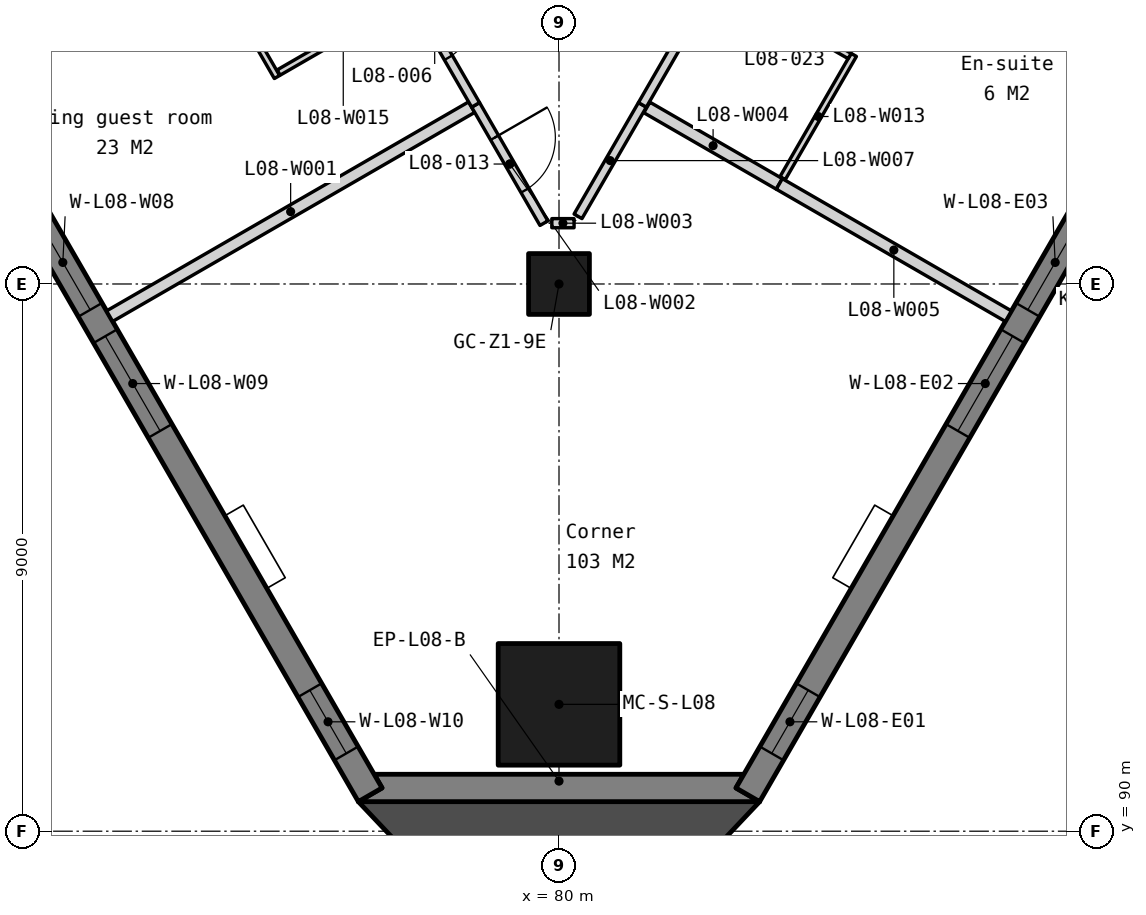
"""IFC4 building model, lengths in metres.
Left out: names, types, materials, properties, quantities, classifications, styles, units other than length and angle.
Written with IfcOpenShell. Run it as: python <this file> out.ifc"""

import sys

from ifc_helpers import new_model, si_unit, direction, frame, frame_2d, origin, origin_2d, place, context, subcontext, project, spatial, polyline, rectangle, outline, extrude, element, fill, save


model = new_model("IFC4")
c1 = context("Model", 3, precision=1e-05, world=origin(), true_north=direction((0.0, 1.0)))
c2 = subcontext(c1, "Body", "Model", "MODEL_VIEW")
j1 = project(units=[si_unit("LENGTHUNIT", "METRE"), si_unit("PLANEANGLEUNIT", "RADIAN")], contexts=[c1])
p1 = place(None, origin())
s1 = spatial("IfcSite", under=j1, at=p1, CompositionType="ELEMENT")
p2 = place(p1, origin())
s2 = spatial("IfcBuilding", under=s1, at=p2, CompositionType="ELEMENT")
p3 = place(p2, frame((0.0, 0.0, 42.0)))
s3 = spatial("IfcBuildingStorey", under=s2, at=p3, CompositionType="ELEMENT", Elevation=42.0)
p4 = place(p3, frame((80.0, 99.0, 0.0), z_axis=(0.0, 0.0, 1.0), x_axis=(1.0, 0.0, 0.0)))
e1 = element("IfcColumn", 1, at=p4, inside=s3, PredefinedType="COLUMN", context=c2, shape_type="SweptSolid", body=[
    extrude(rectangle(XDim=1.0, YDim=1.0, at=origin_2d()), origin(), (0.0, 0.0, 1.0), 3.5),
])
p5 = place(p3, frame((80.0, 92.086, 0.0), z_axis=(0.0, 0.0, 1.0), x_axis=(1.0, 0.0, 0.0)))
e2 = element("IfcColumn", 2, at=p5, inside=s3, PredefinedType="COLUMN", context=c2, shape_type="SweptSolid", body=[
    extrude(rectangle(XDim=2.0, YDim=2.0, at=origin_2d()), origin(), (0.0, 0.0, 1.0), 3.5),
])
p6 = place(p3, frame((0.0, 0.0, -0.15)))
e3 = element("IfcWall", 3, at=p6, inside=s3, PredefinedType="SOLIDWALL", context=c2, shape_type="SweptSolid", body=[
    extrude(outline(polyline([(76.7, 90.486), (77.09, 90.711), (76.96, 90.936), (83.04, 90.936), (82.91, 90.711), (83.3, 90.486), (76.7, 90.486)])), origin(), (0.0, 0.0, 1.0), 3.5),
])
p7 = place(p3, frame((54.495, 129.397, -0.15), z_axis=(0.0, 0.0, 1.0), x_axis=(0.499999201451, -0.866025864826, 0.0)))
e4 = element("IfcWall", 4, at=p7, inside=s3, PredefinedType="SOLIDWALL", context=c2, shape_type="SweptSolid", body=[
    extrude(outline(polyline([(44.8, 0.0), (44.8, 3.5), (0.0, 3.5), (0.0, 0.0), (44.8, 0.0)])), frame((0.0, 0.225, 0.0), z_axis=(0.0, -1.0, 0.0), x_axis=(1.0, 0.0, 0.0)), (0.0, 0.0, 1.0), 0.45),
])
p8 = place(p7, frame((0.786, 0.0, 1.05)))
e5 = element("IfcOpeningElement", 5, at=p8, cuts=e4, PredefinedType="OPENING", context=c2, shape_type="SweptSolid", body=[
    extrude(rectangle(XDim=1.2, YDim=1.5, at=frame_2d((0.6, 0.75))), frame((0.0, 0.235, 0.0), z_axis=(0.0, -1.0, 0.0), x_axis=(1.0, 0.0, 0.0)), (0.0, 0.0, 1.0), 0.47),
])
p9 = place(p7, frame((6.91, 0.0, 1.05)))
e6 = element("IfcOpeningElement", 6, at=p9, cuts=e4, PredefinedType="OPENING", context=c2, shape_type="SweptSolid", body=[
    extrude(rectangle(XDim=1.8, YDim=1.5, at=frame_2d((0.9, 0.75))), frame((0.0, 0.235, 0.0), z_axis=(0.0, -1.0, 0.0), x_axis=(1.0, 0.0, 0.0)), (0.0, 0.0, 1.0), 0.47),
])
p10 = place(p7, frame((9.21, 0.0, 1.05)))
e7 = element("IfcOpeningElement", 7, at=p10, cuts=e4, PredefinedType="OPENING", context=c2, shape_type="SweptSolid", body=[
    extrude(rectangle(XDim=1.8, YDim=1.5, at=frame_2d((0.9, 0.75))), frame((0.0, 0.235, 0.0), z_axis=(0.0, -1.0, 0.0), x_axis=(1.0, 0.0, 0.0)), (0.0, 0.0, 1.0), 0.47),
])
p11 = place(p7, frame((15.87, 0.0, 1.05)))
e8 = element("IfcOpeningElement", 8, at=p11, cuts=e4, PredefinedType="OPENING", context=c2, shape_type="SweptSolid", body=[
    extrude(rectangle(XDim=1.8, YDim=1.5, at=frame_2d((0.9, 0.75))), frame((0.0, 0.235, 0.0), z_axis=(0.0, -1.0, 0.0), x_axis=(1.0, 0.0, 0.0)), (0.0, 0.0, 1.0), 0.47),
])
p12 = place(p7, frame((18.17, 0.0, 1.05)))
e9 = element("IfcOpeningElement", 9, at=p12, cuts=e4, PredefinedType="OPENING", context=c2, shape_type="SweptSolid", body=[
    extrude(rectangle(XDim=1.8, YDim=1.5, at=frame_2d((0.9, 0.75))), frame((0.0, 0.235, 0.0), z_axis=(0.0, -1.0, 0.0), x_axis=(1.0, 0.0, 0.0)), (0.0, 0.0, 1.0), 0.47),
])
p13 = place(p7, frame((24.83, 0.0, 1.05)))
e10 = element("IfcOpeningElement", 10, at=p13, cuts=e4, PredefinedType="OPENING", context=c2, shape_type="SweptSolid", body=[
    extrude(rectangle(XDim=1.8, YDim=1.5, at=frame_2d((0.9, 0.75))), frame((0.0, 0.235, 0.0), z_axis=(0.0, -1.0, 0.0), x_axis=(1.0, 0.0, 0.0)), (0.0, 0.0, 1.0), 0.47),
])
p14 = place(p7, frame((27.13, 0.0, 1.05)))
e11 = element("IfcOpeningElement", 11, at=p14, cuts=e4, PredefinedType="OPENING", context=c2, shape_type="SweptSolid", body=[
    extrude(rectangle(XDim=1.8, YDim=1.5, at=frame_2d((0.9, 0.75))), frame((0.0, 0.235, 0.0), z_axis=(0.0, -1.0, 0.0), x_axis=(1.0, 0.0, 0.0)), (0.0, 0.0, 1.0), 0.47),
])
p15 = place(p7, frame((33.79, 0.0, 1.05)))
e12 = element("IfcOpeningElement", 12, at=p15, cuts=e4, PredefinedType="OPENING", context=c2, shape_type="SweptSolid", body=[
    extrude(rectangle(XDim=1.8, YDim=1.5, at=frame_2d((0.9, 0.75))), frame((0.0, 0.235, 0.0), z_axis=(0.0, -1.0, 0.0), x_axis=(1.0, 0.0, 0.0)), (0.0, 0.0, 1.0), 0.47),
])
p16 = place(p7, frame((36.09, 0.0, 1.05)))
e13 = element("IfcOpeningElement", 13, at=p16, cuts=e4, PredefinedType="OPENING", context=c2, shape_type="SweptSolid", body=[
    extrude(rectangle(XDim=1.8, YDim=1.5, at=frame_2d((0.9, 0.75))), frame((0.0, 0.235, 0.0), z_axis=(0.0, -1.0, 0.0), x_axis=(1.0, 0.0, 0.0)), (0.0, 0.0, 1.0), 0.47),
])
p17 = place(p7, frame((42.814, 0.0, 1.05)))
e14 = element("IfcOpeningElement", 14, at=p17, cuts=e4, PredefinedType="OPENING", context=c2, shape_type="SweptSolid", body=[
    extrude(rectangle(XDim=1.2, YDim=1.5, at=frame_2d((0.6, 0.75))), frame((0.0, 0.235, 0.0), z_axis=(0.0, -1.0, 0.0), x_axis=(1.0, 0.0, 0.0)), (0.0, 0.0, 1.0), 0.47),
])
p18 = place(p3, frame((83.105, 90.599, -0.15), z_axis=(0.0, 0.0, 1.0), x_axis=(0.499999201451, 0.866025864826, 0.0)))
e15 = element("IfcWall", 15, at=p18, inside=s3, PredefinedType="SOLIDWALL", context=c2, shape_type="SweptSolid", body=[
    extrude(outline(polyline([(44.8, 0.0), (44.8, 3.5), (0.0, 3.5), (0.0, 0.0), (44.8, 0.0)])), frame((0.0, 0.225, 0.0), z_axis=(0.0, -1.0, 0.0), x_axis=(1.0, 0.0, 0.0)), (0.0, 0.0, 1.0), 0.45),
])
p19 = place(p18, frame((0.786, 0.0, 1.05)))
e16 = element("IfcOpeningElement", 16, at=p19, cuts=e15, PredefinedType="OPENING", context=c2, shape_type="SweptSolid", body=[
    extrude(rectangle(XDim=1.2, YDim=1.5, at=frame_2d((0.6, 0.75))), frame((0.0, 0.235, 0.0), z_axis=(0.0, -1.0, 0.0), x_axis=(1.0, 0.0, 0.0)), (0.0, 0.0, 1.0), 0.47),
])
p20 = place(p18, frame((6.91, 0.0, 1.05)))
e17 = element("IfcOpeningElement", 17, at=p20, cuts=e15, PredefinedType="OPENING", context=c2, shape_type="SweptSolid", body=[
    extrude(rectangle(XDim=1.8, YDim=1.5, at=frame_2d((0.9, 0.75))), frame((0.0, 0.235, 0.0), z_axis=(0.0, -1.0, 0.0), x_axis=(1.0, 0.0, 0.0)), (0.0, 0.0, 1.0), 0.47),
])
p21 = place(p18, frame((9.21, 0.0, 1.05)))
e18 = element("IfcOpeningElement", 18, at=p21, cuts=e15, PredefinedType="OPENING", context=c2, shape_type="SweptSolid", body=[
    extrude(rectangle(XDim=1.8, YDim=1.5, at=frame_2d((0.9, 0.75))), frame((0.0, 0.235, 0.0), z_axis=(0.0, -1.0, 0.0), x_axis=(1.0, 0.0, 0.0)), (0.0, 0.0, 1.0), 0.47),
])
p22 = place(p18, frame((15.87, 0.0, 1.05)))
e19 = element("IfcOpeningElement", 19, at=p22, cuts=e15, PredefinedType="OPENING", context=c2, shape_type="SweptSolid", body=[
    extrude(rectangle(XDim=1.8, YDim=1.5, at=frame_2d((0.9, 0.75))), frame((0.0, 0.235, 0.0), z_axis=(0.0, -1.0, 0.0), x_axis=(1.0, 0.0, 0.0)), (0.0, 0.0, 1.0), 0.47),
])
p23 = place(p18, frame((18.17, 0.0, 1.05)))
e20 = element("IfcOpeningElement", 20, at=p23, cuts=e15, PredefinedType="OPENING", context=c2, shape_type="SweptSolid", body=[
    extrude(rectangle(XDim=1.8, YDim=1.5, at=frame_2d((0.9, 0.75))), frame((0.0, 0.235, 0.0), z_axis=(0.0, -1.0, 0.0), x_axis=(1.0, 0.0, 0.0)), (0.0, 0.0, 1.0), 0.47),
])
p24 = place(p18, frame((24.83, 0.0, 1.05)))
e21 = element("IfcOpeningElement", 21, at=p24, cuts=e15, PredefinedType="OPENING", context=c2, shape_type="SweptSolid", body=[
    extrude(rectangle(XDim=1.8, YDim=1.5, at=frame_2d((0.9, 0.75))), frame((0.0, 0.235, 0.0), z_axis=(0.0, -1.0, 0.0), x_axis=(1.0, 0.0, 0.0)), (0.0, 0.0, 1.0), 0.47),
])
p25 = place(p18, frame((27.13, 0.0, 1.05)))
e22 = element("IfcOpeningElement", 22, at=p25, cuts=e15, PredefinedType="OPENING", context=c2, shape_type="SweptSolid", body=[
    extrude(rectangle(XDim=1.8, YDim=1.5, at=frame_2d((0.9, 0.75))), frame((0.0, 0.235, 0.0), z_axis=(0.0, -1.0, 0.0), x_axis=(1.0, 0.0, 0.0)), (0.0, 0.0, 1.0), 0.47),
])
p26 = place(p18, frame((33.79, 0.0, 1.05)))
e23 = element("IfcOpeningElement", 23, at=p26, cuts=e15, PredefinedType="OPENING", context=c2, shape_type="SweptSolid", body=[
    extrude(rectangle(XDim=1.8, YDim=1.5, at=frame_2d((0.9, 0.75))), frame((0.0, 0.235, 0.0), z_axis=(0.0, -1.0, 0.0), x_axis=(1.0, 0.0, 0.0)), (0.0, 0.0, 1.0), 0.47),
])
p27 = place(p18, frame((36.09, 0.0, 1.05)))
e24 = element("IfcOpeningElement", 24, at=p27, cuts=e15, PredefinedType="OPENING", context=c2, shape_type="SweptSolid", body=[
    extrude(rectangle(XDim=1.8, YDim=1.5, at=frame_2d((0.9, 0.75))), frame((0.0, 0.235, 0.0), z_axis=(0.0, -1.0, 0.0), x_axis=(1.0, 0.0, 0.0)), (0.0, 0.0, 1.0), 0.47),
])
p28 = place(p18, frame((42.814, 0.0, 1.05)))
e25 = element("IfcOpeningElement", 25, at=p28, cuts=e15, PredefinedType="OPENING", context=c2, shape_type="SweptSolid", body=[
    extrude(rectangle(XDim=1.2, YDim=1.5, at=frame_2d((0.6, 0.75))), frame((0.0, 0.235, 0.0), z_axis=(0.0, -1.0, 0.0), x_axis=(1.0, 0.0, 0.0)), (0.0, 0.0, 1.0), 0.47),
])
p29 = place(p3, frame((0.0, 0.0, -0.15)))
e26 = element("IfcWall", 26, at=p29, inside=s3, PredefinedType="SOLIDWALL", context=c2, shape_type="SweptSolid", body=[
    extrude(outline(polyline([(76.7, 90.486), (80.0, 86.996), (83.3, 90.486), (76.7, 90.486)])), origin(), (0.0, 0.0, 1.0), 3.5),
])
p30 = place(p3, frame((72.61, 98.471, 0.0), z_axis=(0.0, 0.0, 1.0), x_axis=(0.866031836714, 0.499988857673, 0.0)))
e27 = element("IfcWall", 27, at=p30, inside=s3, PredefinedType="PARTITIONING", context=c2, shape_type="SweptSolid", body=[
    extrude(rectangle(XDim=6.875, YDim=0.2, at=frame_2d((3.438, 0.0))), origin(), (0.0, 0.0, 1.0), 3.35),
])
p31 = place(p3, frame((78.629, 101.946, 0.0), z_axis=(0.0, 0.0, 1.0), x_axis=(0.499960746528, -0.866048065601, 0.0)))
e28 = element("IfcWall", 28, at=p31, inside=s3, PredefinedType="PARTITIONING", context=c2, shape_type="SweptSolid", body=[
    extrude(rectangle(XDim=2.247, YDim=0.15, at=frame_2d((1.124, 0.0))), origin(), (0.0, 0.0, 1.0), 3.35),
])
p32 = place(p31, frame((0.624, 0.0, 0.0)))
e29 = element("IfcOpeningElement", 29, at=p32, cuts=e28, PredefinedType="OPENING", context=c2, shape_type="SweptSolid", body=[
    extrude(rectangle(XDim=1.0, YDim=2.1, at=frame_2d((0.5, 1.05))), frame((0.0, 0.085, 0.0), z_axis=(0.0, -1.0, 0.0), x_axis=(1.0, 0.0, 0.0)), (0.0, 0.0, 1.0), 0.17),
])
p33 = place(p3, frame((79.882, 100.0, 0.0), z_axis=(0.0, 0.0, 1.0), x_axis=(1.0, 0.0, 0.0)))
e30 = element("IfcWall", 30, at=p33, inside=s3, PredefinedType="PARTITIONING", context=c2, shape_type="SweptSolid", body=[
    extrude(rectangle(XDim=0.365, YDim=0.15, at=frame_2d((0.183, 0.0))), origin(), (0.0, 0.0, 1.0), 3.35),
])
p34 = place(p3, frame((81.445, 101.903, 0.0), z_axis=(0.0, 0.0, 1.0), x_axis=(0.866048176357, -0.499960554673, 0.0)))
e31 = element("IfcWall", 31, at=p34, inside=s3, PredefinedType="PARTITIONING", context=c2, shape_type="SweptSolid", body=[
    extrude(rectangle(XDim=2.515, YDim=0.2, at=frame_2d((1.257, 0.0))), origin(), (0.0, 0.0, 1.0), 3.35),
])
p35 = place(p3, frame((83.623, 100.646, 0.0), z_axis=(0.0, 0.0, 1.0), x_axis=(0.866027639635, -0.499996127374, 0.0)))
e32 = element("IfcWall", 32, at=p35, inside=s3, PredefinedType="PARTITIONING", context=c2, shape_type="SweptSolid", body=[
    extrude(rectangle(XDim=4.35, YDim=0.2, at=frame_2d((2.175, 0.0))), origin(), (0.0, 0.0, 1.0), 3.35),
])
p36 = place(p3, frame((76.389, 105.826, 0.0), z_axis=(0.0, 0.0, 1.0), x_axis=(0.499989762656, -0.866031314237, 0.0)))
e33 = element("IfcWall", 33, at=p36, inside=s3, PredefinedType="PARTITIONING", context=c2, shape_type="SweptSolid", body=[
    extrude(rectangle(XDim=4.48, YDim=0.15, at=frame_2d((2.24, 0.0))), origin(), (0.0, 0.0, 1.0), 3.35),
])
p37 = place(p36, frame((2.684, 0.0, 0.0)))
e34 = element("IfcOpeningElement", 34, at=p37, cuts=e33, PredefinedType="OPENING", context=c2, shape_type="SweptSolid", body=[
    extrude(rectangle(XDim=0.9, YDim=2.1, at=frame_2d((0.45, 1.05))), frame((0.0, 0.085, 0.0), z_axis=(0.0, -1.0, 0.0), x_axis=(1.0, 0.0, 0.0)), (0.0, 0.0, 1.0), 0.17),
])
p38 = place(p3, frame((80.313, 100.113, 0.0), z_axis=(0.0, 0.0, 1.0), x_axis=(0.5000585414, 0.865991602253, 0.0)))
e35 = element("IfcWall", 35, at=p38, inside=s3, PredefinedType="PARTITIONING", context=c2, shape_type="SweptSolid", body=[
    extrude(rectangle(XDim=2.117, YDim=0.15, at=frame_2d((1.059, 0.0))), origin(), (0.0, 0.0, 1.0), 3.35),
])
p39 = place(p3, frame((70.37, 102.351, 0.0), z_axis=(0.0, 0.0, 1.0), x_axis=(0.866019763911, 0.500009768421, 0.0)))
e36 = element("IfcWall", 36, at=p39, inside=s3, PredefinedType="PARTITIONING", context=c2, shape_type="SweptSolid", body=[
    extrude(rectangle(XDim=6.865, YDim=0.2, at=frame_2d((3.433, 0.0))), origin(), (0.0, 0.0, 1.0), 3.35),
])
p40 = place(p3, frame((85.863, 104.526, 0.0), z_axis=(0.0, 0.0, 1.0), x_axis=(0.866027639635, -0.499996127374, 0.0)))
e37 = element("IfcWall", 37, at=p40, inside=s3, PredefinedType="PARTITIONING", context=c2, shape_type="SweptSolid", body=[
    extrude(rectangle(XDim=4.35, YDim=0.2, at=frame_2d((2.175, 0.0))), origin(), (0.0, 0.0, 1.0), 3.35),
])
p41 = place(p3, frame((74.187, 104.439, 0.0), z_axis=(0.0, 0.0, 1.0), x_axis=(0.499938297808, -0.866061024631, 0.0)))
e38 = element("IfcWall", 38, at=p41, inside=s3, PredefinedType="PARTITIONING", context=c2, shape_type="SweptSolid", body=[
    extrude(rectangle(XDim=2.35, YDim=0.1, at=frame_2d((1.175, 0.0))), origin(), (0.0, 0.0, 1.0), 3.35),
])
p42 = place(p3, frame((83.678, 100.741, 0.0), z_axis=(0.0, 0.0, 1.0), x_axis=(0.500077683152, 0.86598054875, 0.0)))
e39 = element("IfcWall", 39, at=p42, inside=s3, PredefinedType="PARTITIONING", context=c2, shape_type="SweptSolid", body=[
    extrude(rectangle(XDim=2.34, YDim=0.1, at=frame_2d((1.17, 0.0))), origin(), (0.0, 0.0, 1.0), 3.35),
])
p43 = place(p3, frame((75.389, 102.477, 0.0), z_axis=(0.0, 0.0, 1.0), x_axis=(0.866006720078, 0.500032359733, 0.0)))
e40 = element("IfcWall", 40, at=p43, inside=s3, PredefinedType="PARTITIONING", context=c2, shape_type="SweptSolid", body=[
    extrude(rectangle(XDim=2.455, YDim=0.1, at=frame_2d((1.228, 0.0))), origin(), (0.0, 0.0, 1.0), 3.35),
])
p44 = place(p43, frame((0.827, 0.0, 0.0)))
e41 = element("IfcOpeningElement", 41, at=p44, cuts=e40, PredefinedType="OPENING", context=c2, shape_type="SweptSolid", body=[
    extrude(rectangle(XDim=0.8, YDim=2.1, at=frame_2d((0.4, 1.05))), frame((0.0, 0.06, 0.0), z_axis=(0.0, -1.0, 0.0), x_axis=(1.0, 0.0, 0.0)), (0.0, 0.0, 1.0), 0.12),
])
p45 = place(p3, frame((82.636, 103.987, 0.0), z_axis=(0.0, 0.0, 1.0), x_axis=(0.866006523861, -0.500032699561, 0.0)))
e42 = element("IfcWall", 42, at=p45, inside=s3, PredefinedType="PARTITIONING", context=c2, shape_type="SweptSolid", body=[
    extrude(rectangle(XDim=2.475, YDim=0.1, at=frame_2d((1.237, 0.0))), origin(), (0.0, 0.0, 1.0), 3.35),
])
p46 = place(p45, frame((0.837, 0.0, 0.0)))
e43 = element("IfcOpeningElement", 43, at=p46, cuts=e42, PredefinedType="OPENING", context=c2, shape_type="SweptSolid", body=[
    extrude(rectangle(XDim=0.8, YDim=2.1, at=frame_2d((0.4, 1.05))), frame((0.0, 0.06, 0.0), z_axis=(0.0, -1.0, 0.0), x_axis=(1.0, 0.0, 0.0)), (0.0, 0.0, 1.0), 0.12),
])
p47 = place(p3, frame((81.371, 101.946, 0.0), z_axis=(0.0, 0.0, 1.0), x_axis=(0.499989762656, 0.866031314237, 0.0)))
e44 = element("IfcWall", 44, at=p47, inside=s3, PredefinedType="PARTITIONING", context=c2, shape_type="SweptSolid", body=[
    extrude(rectangle(XDim=4.48, YDim=0.15, at=frame_2d((2.24, 0.0))), origin(), (0.0, 0.0, 1.0), 3.35),
])
p48 = place(p47, frame((2.684, 0.0, 0.0)))
e45 = element("IfcOpeningElement", 45, at=p48, cuts=e44, PredefinedType="OPENING", context=c2, shape_type="SweptSolid", body=[
    extrude(rectangle(XDim=0.9, YDim=2.1, at=frame_2d((0.45, 1.05))), frame((0.0, 0.085, 0.0), z_axis=(0.0, -1.0, 0.0), x_axis=(1.0, 0.0, 0.0)), (0.0, 0.0, 1.0), 0.17),
])
p49 = place(p15, origin())
e46 = element("IfcWindow", 46, at=p49, inside=s3, PartitioningType="SINGLE_PANEL", PredefinedType="WINDOW", context=c2, shape_type="SweptSolid", body=[
    extrude(rectangle(XDim=1.8, YDim=1.5, at=frame_2d((0.9, 0.75))), frame((0.0, 0.03, 0.0), z_axis=(0.0, -1.0, 0.0), x_axis=(1.0, 0.0, 0.0)), (0.0, 0.0, 1.0), 0.06),
])
fill(e12, e46)
p50 = place(p16, origin())
e47 = element("IfcWindow", 47, at=p50, inside=s3, PartitioningType="SINGLE_PANEL", PredefinedType="WINDOW", context=c2, shape_type="SweptSolid", body=[
    extrude(rectangle(XDim=1.8, YDim=1.5, at=frame_2d((0.9, 0.75))), frame((0.0, 0.03, 0.0), z_axis=(0.0, -1.0, 0.0), x_axis=(1.0, 0.0, 0.0)), (0.0, 0.0, 1.0), 0.06),
])
fill(e13, e47)
p51 = place(p17, origin())
e48 = element("IfcWindow", 48, at=p51, inside=s3, PartitioningType="SINGLE_PANEL", PredefinedType="WINDOW", context=c2, shape_type="SweptSolid", body=[
    extrude(rectangle(XDim=1.2, YDim=1.5, at=frame_2d((0.6, 0.75))), frame((0.0, 0.03, 0.0), z_axis=(0.0, -1.0, 0.0), x_axis=(1.0, 0.0, 0.0)), (0.0, 0.0, 1.0), 0.06),
])
fill(e14, e48)
p52 = place(p19, origin())
e49 = element("IfcWindow", 49, at=p52, inside=s3, PartitioningType="SINGLE_PANEL", PredefinedType="WINDOW", context=c2, shape_type="SweptSolid", body=[
    extrude(rectangle(XDim=1.2, YDim=1.5, at=frame_2d((0.6, 0.75))), frame((0.0, 0.03, 0.0), z_axis=(0.0, -1.0, 0.0), x_axis=(1.0, 0.0, 0.0)), (0.0, 0.0, 1.0), 0.06),
])
fill(e16, e49)
p53 = place(p20, origin())
e50 = element("IfcWindow", 50, at=p53, inside=s3, PartitioningType="SINGLE_PANEL", PredefinedType="WINDOW", context=c2, shape_type="SweptSolid", body=[
    extrude(rectangle(XDim=1.8, YDim=1.5, at=frame_2d((0.9, 0.75))), frame((0.0, 0.03, 0.0), z_axis=(0.0, -1.0, 0.0), x_axis=(1.0, 0.0, 0.0)), (0.0, 0.0, 1.0), 0.06),
])
fill(e17, e50)
p54 = place(p21, origin())
e51 = element("IfcWindow", 51, at=p54, inside=s3, PartitioningType="SINGLE_PANEL", PredefinedType="WINDOW", context=c2, shape_type="SweptSolid", body=[
    extrude(rectangle(XDim=1.8, YDim=1.5, at=frame_2d((0.9, 0.75))), frame((0.0, 0.03, 0.0), z_axis=(0.0, -1.0, 0.0), x_axis=(1.0, 0.0, 0.0)), (0.0, 0.0, 1.0), 0.06),
])
fill(e18, e51)
p55 = place(p37, origin())
e52 = element("IfcDoor", 52, at=p55, inside=s3, OperationType="SINGLE_SWING_LEFT", PredefinedType="DOOR", context=c2, shape_type="SweptSolid", body=[
    extrude(rectangle(XDim=0.9, YDim=2.1, at=frame_2d((0.45, 1.05))), frame((0.0, 0.025, 0.0), z_axis=(0.0, -1.0, 0.0), x_axis=(1.0, 0.0, 0.0)), (0.0, 0.0, 1.0), 0.05),
])
fill(e34, e52)
p56 = place(p32, origin())
e53 = element("IfcDoor", 53, at=p56, inside=s3, OperationType="SINGLE_SWING_LEFT", PredefinedType="DOOR", context=c2, shape_type="SweptSolid", body=[
    extrude(rectangle(XDim=1.0, YDim=2.1, at=frame_2d((0.5, 1.05))), frame((0.0, 0.025, 0.0), z_axis=(0.0, -1.0, 0.0), x_axis=(1.0, 0.0, 0.0)), (0.0, 0.0, 1.0), 0.05),
])
fill(e29, e53)
save(model, sys.argv[1])
